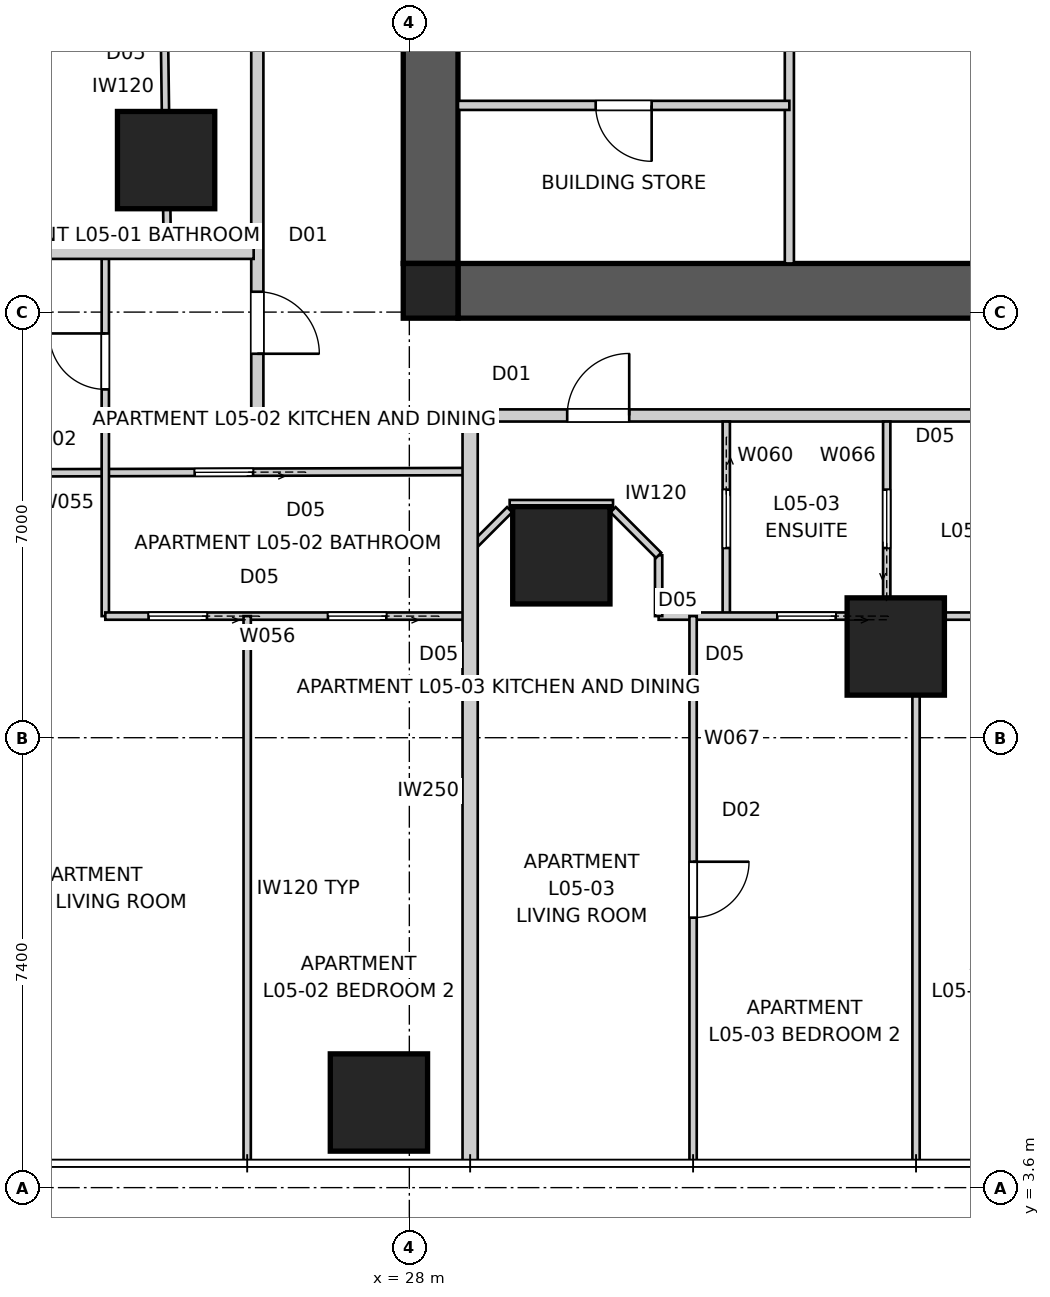
"""IFC4 building model, lengths in metres.
Left out: names, types, materials, properties, quantities, classifications, styles, units other than length and angle.
Written with IfcOpenShell. Run it as: python <this file> out.ifc"""

import sys

from ifc_helpers import new_model, si_unit, direction, frame, frame_2d, origin, origin_2d, place, context, subcontext, project, spatial, polyline, rectangle, outline, extrude, element, fill, save


model = new_model("IFC4")
c1 = context("Model", 3, precision=1e-05, world=origin(), true_north=direction((0.0, 1.0)))
c2 = subcontext(c1, "Body", "Model", "MODEL_VIEW")
j1 = project(units=[si_unit("LENGTHUNIT", "METRE"), si_unit("PLANEANGLEUNIT", "RADIAN")], contexts=[c1])
p1 = place(None, origin())
s1 = spatial("IfcSite", under=j1, at=p1, CompositionType="ELEMENT")
p2 = place(p1, origin())
s2 = spatial("IfcBuilding", under=s1, at=p2, CompositionType="ELEMENT")
p3 = place(p2, frame((0.0, 0.0, 21.8)))
s3 = spatial("IfcBuildingStorey", under=s2, at=p3, CompositionType="ELEMENT", Elevation=21.8)
p4 = place(p3, frame((51.2, 18.35, 0.0), z_axis=(0.0, 0.0, 1.0), x_axis=(-1.0, 0.0, 0.0)))
e1 = element("IfcWall", 1, at=p4, inside=s3, PredefinedType="SHEAR", context=c2, shape_type="SweptSolid", body=[
    extrude(outline(polyline([(0.0, -0.45), (22.4, -0.45), (22.4, -0.025), (22.85, -0.025), (22.85, 0.025), (22.4, 0.025), (22.4, 0.45), (0.0, 0.45), (0.0, 0.025), (-0.45, 0.025), (-0.45, -0.025), (0.0, -0.025), (0.0, -0.45)])), origin(), (0.0, 0.0, 1.0), 3.4),
])
p5 = place(p3, frame((28.35, 41.2, 0.0), z_axis=(0.0, 0.0, 1.0), x_axis=(0.0, -1.0, 0.0)))
e2 = element("IfcWall", 2, at=p5, inside=s3, PredefinedType="SHEAR", context=c2, shape_type="SweptSolid", body=[
    extrude(outline(polyline([(0.0, -0.45), (22.4, -0.45), (22.4, -0.025), (22.85, -0.025), (22.85, 0.025), (22.4, 0.025), (22.4, 0.45), (0.0, 0.45), (0.0, 0.025), (-0.45, 0.025), (-0.45, -0.025), (0.0, -0.025), (0.0, -0.45)])), origin(), (0.0, 0.0, 1.0), 3.4),
])
p6 = place(p5, frame((11.14, 0.0, 0.0)))
e3 = element("IfcOpeningElement", 3, at=p6, cuts=e2, PredefinedType="OPENING", context=c2, shape_type="SweptSolid", body=[
    extrude(rectangle(XDim=1.02, YDim=2.4, at=frame_2d((0.51, 1.2))), frame((0.0, 0.46, 0.0), z_axis=(0.0, -1.0, 0.0), x_axis=(1.0, 0.0, 0.0)), (0.0, 0.0, 1.0), 0.92),
])
p7 = place(p3, frame((28.35, 18.35, 0.0), z_axis=(0.0, 0.0, 1.0), x_axis=(1.0, 0.0, 0.0)))
e4 = element("IfcColumn", 4, at=p7, inside=s3, PredefinedType="COLUMN", context=c2, shape_type="SweptSolid", body=[
    extrude(rectangle(XDim=0.9, YDim=0.9, at=origin_2d()), origin(), (0.0, 0.0, 1.0), 3.4),
])
for number, where, z_axis, x_axis in (
    (5, (27.5, 5.0, 0.0), (0.0, 0.0, 1.0), (1.0, 0.0, 0.0)),
    (6, (24.0, 20.5, 0.0), (0.0, 0.0, 1.0), (1.0, 0.0, 0.0)),
    (7, (30.5, 14.0, 0.0), (0.0, 0.0, 1.0), (1.0, 0.0, 0.0)),
    (8, (36.0, 12.5, 0.0), (0.0, 0.0, 1.0), (1.0, 0.0, 0.0)),
):
    element("IfcColumn", number, at=place(p3, frame(where, z_axis=z_axis, x_axis=x_axis)), inside=s3, PredefinedType="COLUMN", context=c2, shape_type="SweptSolid", body=[
        extrude(rectangle(XDim=1.6, YDim=1.6, at=origin_2d()), origin(), (0.0, 0.0, 1.0), 3.4),
    ])
p8 = place(p3, frame((25.5, 16.3, 0.0), z_axis=(0.0, 0.0, 1.0), x_axis=(1.0, 0.0, 0.0)))
e9 = element("IfcWall", 9, at=p8, inside=s3, PredefinedType="PARTITIONING", context=c2, shape_type="SweptSolid", body=[
    extrude(rectangle(XDim=29.0, YDim=0.2, at=frame_2d((14.5, 0.0))), origin(), (0.0, 0.0, 1.0), 3.25),
])
p9 = place(p8, frame((18.734, 0.0, 0.0)))
e10 = element("IfcOpeningElement", 10, at=p9, cuts=e9, PredefinedType="OPENING", context=c2, shape_type="SweptSolid", body=[
    extrude(rectangle(XDim=1.02, YDim=2.34, at=frame_2d((0.51, 1.17))), frame((0.0, 0.11, 0.0), z_axis=(0.0, -1.0, 0.0), x_axis=(1.0, 0.0, 0.0)), (0.0, 0.0, 1.0), 0.22),
])
p10 = place(p8, frame((5.096, 0.0, 0.0)))
e11 = element("IfcOpeningElement", 11, at=p10, cuts=e9, PredefinedType="OPENING", context=c2, shape_type="SweptSolid", body=[
    extrude(rectangle(XDim=1.02, YDim=2.34, at=frame_2d((0.51, 1.17))), frame((0.0, 0.11, 0.0), z_axis=(0.0, -1.0, 0.0), x_axis=(1.0, 0.0, 0.0)), (0.0, 0.0, 1.0), 0.22),
])
p11 = place(p3, frame((25.5, 43.7, 0.0), z_axis=(0.0, 0.0, 1.0), x_axis=(0.0, -1.0, 0.0)))
e12 = element("IfcWall", 12, at=p11, inside=s3, PredefinedType="PARTITIONING", context=c2, shape_type="SweptSolid", body=[
    extrude(rectangle(XDim=27.4, YDim=0.2, at=frame_2d((13.7, 0.0))), origin(), (0.0, 0.0, 1.0), 3.25),
])
p12 = place(p11, frame((5.493, 0.0, 0.0)))
e13 = element("IfcOpeningElement", 13, at=p12, cuts=e12, PredefinedType="OPENING", context=c2, shape_type="SweptSolid", body=[
    extrude(rectangle(XDim=1.02, YDim=2.34, at=frame_2d((0.51, 1.17))), frame((0.0, 0.11, 0.0), z_axis=(0.0, -1.0, 0.0), x_axis=(1.0, 0.0, 0.0)), (0.0, 0.0, 1.0), 0.22),
])
p13 = place(p11, frame((15.16, 0.0, 0.0)))
e14 = element("IfcOpeningElement", 14, at=p13, cuts=e12, PredefinedType="OPENING", context=c2, shape_type="SweptSolid", body=[
    extrude(rectangle(XDim=1.02, YDim=2.34, at=frame_2d((0.51, 1.17))), frame((0.0, 0.11, 0.0), z_axis=(0.0, -1.0, 0.0), x_axis=(1.0, 0.0, 0.0)), (0.0, 0.0, 1.0), 0.22),
])
p14 = place(p11, frame((25.365, 0.0, 0.0)))
e15 = element("IfcOpeningElement", 15, at=p14, cuts=e12, PredefinedType="OPENING", context=c2, shape_type="SweptSolid", body=[
    extrude(rectangle(XDim=1.02, YDim=2.34, at=frame_2d((0.51, 1.17))), frame((0.0, 0.11, 0.0), z_axis=(0.0, -1.0, 0.0), x_axis=(1.0, 0.0, 0.0)), (0.0, 0.0, 1.0), 0.22),
])
p15 = place(p11, frame((1.015, 0.0, 0.0)))
e16 = element("IfcOpeningElement", 16, at=p15, cuts=e12, PredefinedType="OPENING", context=c2, shape_type="SweptSolid", body=[
    extrude(rectangle(XDim=1.02, YDim=2.34, at=frame_2d((0.51, 1.17))), frame((0.0, 0.11, 0.0), z_axis=(0.0, -1.0, 0.0), x_axis=(1.0, 0.0, 0.0)), (0.0, 0.0, 1.0), 0.22),
])
p16 = place(p3, frame((29.0, 4.0, 0.0), z_axis=(0.0, 0.0, 1.0), x_axis=(0.0, 1.0, 0.0)))
e17 = element("IfcWall", 17, at=p16, inside=s3, PredefinedType="PARTITIONING", context=c2, shape_type="SweptSolid", body=[
    extrude(rectangle(XDim=12.24, YDim=0.25, at=frame_2d((6.12, 0.0))), origin(), (0.0, 0.0, 1.0), 3.25),
])
p17 = place(p3, frame((14.0, 19.0, 0.0), z_axis=(0.0, 0.0, 1.0), x_axis=(1.0, 0.0, 0.0)))
e18 = element("IfcWall", 18, at=p17, inside=s3, PredefinedType="PARTITIONING", context=c2, shape_type="SweptSolid", body=[
    extrude(rectangle(XDim=11.44, YDim=0.25, at=frame_2d((5.72, 0.0))), origin(), (0.0, 0.0, 1.0), 3.25),
])
p18 = place(p3, frame((34.25, 18.8, 0.0), z_axis=(0.0, 0.0, 1.0), x_axis=(0.0, 1.0, 0.0)))
e19 = element("IfcWall", 19, at=p18, inside=s3, PredefinedType="SOLIDWALL", context=c2, shape_type="SweptSolid", body=[
    extrude(rectangle(XDim=5.9, YDim=0.15, at=frame_2d((2.95, 0.0))), origin(), (0.0, 0.0, 1.0), 3.25),
])
p19 = place(p3, frame((34.25, 21.4, 0.0), z_axis=(0.0, 0.0, 1.0), x_axis=(-1.0, 0.0, 0.0)))
e20 = element("IfcWall", 20, at=p19, inside=s3, PredefinedType="SOLIDWALL", context=c2, shape_type="SweptSolid", body=[
    extrude(rectangle(XDim=5.45, YDim=0.15, at=frame_2d((2.725, 0.0))), origin(), (0.0, 0.0, 1.0), 3.25),
])
p20 = place(p19, frame((2.265, 0.0, 0.0)))
e21 = element("IfcOpeningElement", 21, at=p20, cuts=e20, PredefinedType="OPENING", context=c2, shape_type="SweptSolid", body=[
    extrude(rectangle(XDim=0.92, YDim=2.1, at=frame_2d((0.46, 1.05))), frame((0.0, 0.085, 0.0), z_axis=(0.0, -1.0, 0.0), x_axis=(1.0, 0.0, 0.0)), (0.0, 0.0, 1.0), 0.17),
])
p21 = place(p3, frame((24.02, 19.0, 0.0), z_axis=(0.0, 0.0, 1.0), x_axis=(-0.013494388256, 0.999908946597, 0.0)))
e22 = element("IfcWall", 22, at=p21, inside=s3, PredefinedType="PARTITIONING", context=c2, shape_type="SweptSolid", body=[
    extrude(rectangle(XDim=3.872, YDim=0.12, at=frame_2d((1.936, 0.0))), origin(), (0.0, 0.0, 1.0), 2.549),
])
p22 = place(p3, frame((29.0, 15.378, 0.0), z_axis=(0.0, 0.0, 1.0), x_axis=(-0.999995589081, -0.002970154664, 0.0)))
e23 = element("IfcWall", 23, at=p22, inside=s3, PredefinedType="PARTITIONING", context=c2, shape_type="SweptSolid", body=[
    extrude(rectangle(XDim=14.96, YDim=0.12, at=frame_2d((7.48, 0.0))), origin(), (0.0, 0.0, 1.0), 2.638),
])
p23 = place(p22, frame((3.57, 0.0, 0.0)))
e24 = element("IfcOpeningElement", 24, at=p23, cuts=e23, PredefinedType="OPENING", context=c2, shape_type="SweptSolid", body=[
    extrude(rectangle(XDim=0.96, YDim=2.1, at=frame_2d((0.48, 1.05))), frame((0.0, 0.07, 0.0), z_axis=(0.0, -1.0, 0.0), x_axis=(1.0, 0.0, 0.0)), (0.0, 0.0, 1.0), 0.14),
])
p24 = place(p3, frame((23.0, 13.0, 0.0), z_axis=(0.0, 0.0, 1.0), x_axis=(0.0, 1.0, 0.0)))
e25 = element("IfcWall", 25, at=p24, inside=s3, PredefinedType="PARTITIONING", context=c2, shape_type="SweptSolid", body=[
    extrude(rectangle(XDim=6.0, YDim=0.12, at=frame_2d((3.0, 0.0))), origin(), (0.0, 0.0, 1.0), 3.25),
])
p25 = place(p24, frame((3.729, 0.0, 0.0)))
e26 = element("IfcOpeningElement", 26, at=p25, cuts=e25, PredefinedType="OPENING", context=c2, shape_type="SweptSolid", body=[
    extrude(rectangle(XDim=0.92, YDim=2.34, at=frame_2d((0.46, 1.17))), frame((0.0, 0.07, 0.0), z_axis=(0.0, -1.0, 0.0), x_axis=(1.0, 0.0, 0.0)), (0.0, 0.0, 1.0), 0.14),
])
p26 = place(p3, frame((29.0, 13.0, 0.0), z_axis=(0.0, 0.0, 1.0), x_axis=(-1.0, 0.0, 0.0)))
e27 = element("IfcWall", 27, at=p26, inside=s3, PredefinedType="PARTITIONING", context=c2, shape_type="SweptSolid", body=[
    extrude(rectangle(XDim=6.0, YDim=0.12, at=frame_2d((3.0, 0.0))), origin(), (0.0, 0.0, 1.0), 3.25),
])
p27 = place(p26, frame((1.378, 0.0, 0.0)))
e28 = element("IfcOpeningElement", 28, at=p27, cuts=e27, PredefinedType="OPENING", context=c2, shape_type="SweptSolid", body=[
    extrude(rectangle(XDim=0.96, YDim=2.1, at=frame_2d((0.48, 1.05))), frame((0.0, 0.07, 0.0), z_axis=(0.0, -1.0, 0.0), x_axis=(1.0, 0.0, 0.0)), (0.0, 0.0, 1.0), 0.14),
])
p28 = place(p26, frame((4.328, 0.0, 0.0)))
e29 = element("IfcOpeningElement", 29, at=p28, cuts=e27, PredefinedType="OPENING", context=c2, shape_type="SweptSolid", body=[
    extrude(rectangle(XDim=0.96, YDim=2.1, at=frame_2d((0.48, 1.05))), frame((0.0, 0.07, 0.0), z_axis=(0.0, -1.0, 0.0), x_axis=(1.0, 0.0, 0.0)), (0.0, 0.0, 1.0), 0.14),
])
p29 = place(p3, frame((25.333, 13.0, 0.0), z_axis=(0.0, 0.0, 1.0), x_axis=(0.0, -1.0, 0.0)))
e30 = element("IfcWall", 30, at=p29, inside=s3, PredefinedType="PARTITIONING", context=c2, shape_type="SweptSolid", body=[
    extrude(rectangle(XDim=8.96, YDim=0.12, at=frame_2d((4.48, 0.0))), origin(), (0.0, 0.0, 1.0), 2.638),
])
p30 = place(p3, frame((33.212, 16.2, 0.0), z_axis=(0.0, 0.0, 1.0), x_axis=(0.0, -1.0, 0.0)))
e31 = element("IfcWall", 31, at=p30, inside=s3, PredefinedType="PARTITIONING", context=c2, shape_type="SweptSolid", body=[
    extrude(rectangle(XDim=3.2, YDim=0.12, at=frame_2d((1.6, 0.0))), origin(), (0.0, 0.0, 1.0), 3.25),
])
p31 = place(p30, frame((1.12, 0.0, 0.0)))
e32 = element("IfcOpeningElement", 32, at=p31, cuts=e31, PredefinedType="OPENING", context=c2, shape_type="SweptSolid", body=[
    extrude(rectangle(XDim=0.96, YDim=2.1, at=frame_2d((0.48, 1.05))), frame((0.0, 0.07, 0.0), z_axis=(0.0, -1.0, 0.0), x_axis=(1.0, 0.0, 0.0)), (0.0, 0.0, 1.0), 0.14),
])
p32 = place(p3, frame((47.9, 13.0, 0.0), z_axis=(0.0, 0.0, 1.0), x_axis=(-1.0, 0.0, 0.0)))
e33 = element("IfcWall", 33, at=p32, inside=s3, PredefinedType="PARTITIONING", context=c2, shape_type="SweptSolid", body=[
    extrude(rectangle(XDim=15.8, YDim=0.12, at=frame_2d((7.9, 0.0))), origin(), (0.0, 0.0, 1.0), 2.549),
])
p33 = place(p32, frame((2.083, 0.0, 0.0)))
e34 = element("IfcOpeningElement", 34, at=p33, cuts=e33, PredefinedType="OPENING", context=c2, shape_type="SweptSolid", body=[
    extrude(rectangle(XDim=0.92, YDim=2.34, at=frame_2d((0.46, 1.17))), frame((0.0, 0.07, 0.0), z_axis=(0.0, -1.0, 0.0), x_axis=(1.0, 0.0, 0.0)), (0.0, 0.0, 1.0), 0.14),
])
p34 = place(p32, frame((6.225, 0.0, 0.0)))
e35 = element("IfcOpeningElement", 35, at=p34, cuts=e33, PredefinedType="OPENING", context=c2, shape_type="SweptSolid", body=[
    extrude(rectangle(XDim=0.96, YDim=2.1, at=frame_2d((0.48, 1.05))), frame((0.0, 0.07, 0.0), z_axis=(0.0, -1.0, 0.0), x_axis=(1.0, 0.0, 0.0)), (0.0, 0.0, 1.0), 0.14),
])
p35 = place(p32, frame((12.888, 0.0, 0.0)))
e36 = element("IfcOpeningElement", 36, at=p35, cuts=e33, PredefinedType="OPENING", context=c2, shape_type="SweptSolid", body=[
    extrude(rectangle(XDim=0.96, YDim=2.1, at=frame_2d((0.48, 1.05))), frame((0.0, 0.07, 0.0), z_axis=(0.0, -1.0, 0.0), x_axis=(1.0, 0.0, 0.0)), (0.0, 0.0, 1.0), 0.14),
])
p36 = place(p32, frame((9.278, 0.0, 0.0)))
e37 = element("IfcOpeningElement", 37, at=p36, cuts=e33, PredefinedType="OPENING", context=c2, shape_type="SweptSolid", body=[
    extrude(rectangle(XDim=0.96, YDim=2.1, at=frame_2d((0.48, 1.05))), frame((0.0, 0.07, 0.0), z_axis=(0.0, -1.0, 0.0), x_axis=(1.0, 0.0, 0.0)), (0.0, 0.0, 1.0), 0.14),
])
p37 = place(p3, frame((32.1, 13.0, 0.0), z_axis=(0.0, 0.0, 1.0), x_axis=(0.0, 1.0, 0.0)))
e38 = element("IfcWall", 38, at=p37, inside=s3, PredefinedType="PARTITIONING", context=c2, shape_type="SweptSolid", body=[
    extrude(rectangle(XDim=1.0, YDim=0.12, at=frame_2d((0.5, 0.0))), origin(), (0.0, 0.0, 1.0), 3.25),
])
p38 = place(p3, frame((32.1, 14.0, 0.0), z_axis=(0.0, 0.0, 1.0), x_axis=(-0.707106781187, 0.707106781187, 0.0)))
e39 = element("IfcWall", 39, at=p38, inside=s3, PredefinedType="PARTITIONING", context=c2, shape_type="SweptSolid", body=[
    extrude(rectangle(XDim=1.061, YDim=0.12, at=frame_2d((0.53, 0.0))), origin(), (0.0, 0.0, 1.0), 3.25),
])
p39 = place(p3, frame((31.35, 14.85, 0.0), z_axis=(0.0, 0.0, 1.0), x_axis=(-1.0, 0.0, 0.0)))
e40 = element("IfcWall", 40, at=p39, inside=s3, PredefinedType="PARTITIONING", context=c2, shape_type="SweptSolid", body=[
    extrude(rectangle(XDim=1.7, YDim=0.12, at=frame_2d((0.85, 0.0))), origin(), (0.0, 0.0, 1.0), 3.25),
])
p40 = place(p3, frame((29.65, 14.75, 0.0), z_axis=(0.0, 0.0, 1.0), x_axis=(-0.707106781187, -0.707106781187, 0.0)))
e41 = element("IfcWall", 41, at=p40, inside=s3, PredefinedType="PARTITIONING", context=c2, shape_type="SweptSolid", body=[
    extrude(rectangle(XDim=0.919, YDim=0.12, at=frame_2d((0.459, 0.0))), origin(), (0.0, 0.0, 1.0), 3.25),
])
p41 = place(p3, frame((35.851, 13.0, 0.0), z_axis=(0.0, 0.0, 1.0), x_axis=(0.0, 1.0, 0.0)))
e42 = element("IfcWall", 42, at=p41, inside=s3, PredefinedType="PARTITIONING", context=c2, shape_type="SweptSolid", body=[
    extrude(rectangle(XDim=3.2, YDim=0.12, at=frame_2d((1.6, 0.0))), origin(), (0.0, 0.0, 1.0), 3.25),
])
p42 = place(p41, frame((1.12, 0.0, 0.0)))
e43 = element("IfcOpeningElement", 43, at=p42, cuts=e42, PredefinedType="OPENING", context=c2, shape_type="SweptSolid", body=[
    extrude(rectangle(XDim=0.96, YDim=2.1, at=frame_2d((0.48, 1.05))), frame((0.0, 0.07, 0.0), z_axis=(0.0, -1.0, 0.0), x_axis=(1.0, 0.0, 0.0)), (0.0, 0.0, 1.0), 0.14),
])
p43 = place(p3, frame((32.667, 13.0, 0.0), z_axis=(0.0, 0.0, 1.0), x_axis=(0.0, -1.0, 0.0)))
e44 = element("IfcWall", 44, at=p43, inside=s3, PredefinedType="PARTITIONING", context=c2, shape_type="SweptSolid", body=[
    extrude(rectangle(XDim=8.96, YDim=0.12, at=frame_2d((4.48, 0.0))), origin(), (0.0, 0.0, 1.0), 3.25),
])
p44 = place(p43, frame((4.04, 0.0, 0.0)))
e45 = element("IfcOpeningElement", 45, at=p44, cuts=e44, PredefinedType="OPENING", context=c2, shape_type="SweptSolid", body=[
    extrude(rectangle(XDim=0.92, YDim=2.34, at=frame_2d((0.46, 1.17))), frame((0.0, 0.07, 0.0), z_axis=(0.0, -1.0, 0.0), x_axis=(1.0, 0.0, 0.0)), (0.0, 0.0, 1.0), 0.14),
])
p45 = place(p3, frame((36.333, 4.04, 0.0), z_axis=(0.0, 0.0, 1.0), x_axis=(0.0, 1.0, 0.0)))
e46 = element("IfcWall", 46, at=p45, inside=s3, PredefinedType="PARTITIONING", context=c2, shape_type="SweptSolid", body=[
    extrude(rectangle(XDim=8.96, YDim=0.12, at=frame_2d((4.48, 0.0))), origin(), (0.0, 0.0, 1.0), 3.25),
])
p46 = place(p10, origin())
e47 = element("IfcDoor", 47, at=p46, inside=s3, OperationType="SINGLE_SWING_RIGHT", PredefinedType="DOOR", context=c2, shape_type="SweptSolid", body=[
    extrude(rectangle(XDim=1.02, YDim=2.34, at=frame_2d((0.51, 1.17))), frame((0.0, 0.025, 0.0), z_axis=(0.0, -1.0, 0.0), x_axis=(1.0, 0.0, 0.0)), (0.0, 0.0, 1.0), 0.05),
])
fill(e11, e47)
p47 = place(p14, origin())
e48 = element("IfcDoor", 48, at=p47, inside=s3, OperationType="SINGLE_SWING_RIGHT", PredefinedType="DOOR", context=c2, shape_type="SweptSolid", body=[
    extrude(rectangle(XDim=1.02, YDim=2.34, at=frame_2d((0.51, 1.17))), frame((0.0, 0.025, 0.0), z_axis=(0.0, -1.0, 0.0), x_axis=(1.0, 0.0, 0.0)), (0.0, 0.0, 1.0), 0.05),
])
fill(e15, e48)
p48 = place(p20, origin())
e49 = element("IfcDoor", 49, at=p48, inside=s3, OperationType="SINGLE_SWING_LEFT", PredefinedType="DOOR", context=c2, shape_type="SweptSolid", body=[
    extrude(rectangle(XDim=0.92, YDim=2.1, at=frame_2d((0.46, 1.05))), frame((0.0, 0.025, 0.0), z_axis=(0.0, -1.0, 0.0), x_axis=(1.0, 0.0, 0.0)), (0.0, 0.0, 1.0), 0.05),
])
fill(e21, e49)
p49 = place(p31, origin())
e50 = element("IfcDoor", 50, at=p49, inside=s3, OperationType="SLIDING_TO_LEFT", PredefinedType="DOOR", context=c2, shape_type="SweptSolid", body=[
    extrude(rectangle(XDim=0.96, YDim=2.1, at=frame_2d((0.48, 1.05))), frame((0.0, 0.025, 0.0), z_axis=(0.0, -1.0, 0.0), x_axis=(1.0, 0.0, 0.0)), (0.0, 0.0, 1.0), 0.05),
])
fill(e32, e50)
p50 = place(p23, origin())
e51 = element("IfcDoor", 51, at=p50, inside=s3, OperationType="SLIDING_TO_LEFT", PredefinedType="DOOR", context=c2, shape_type="SweptSolid", body=[
    extrude(rectangle(XDim=0.96, YDim=2.1, at=frame_2d((0.48, 1.05))), frame((0.0, 0.025, 0.0), z_axis=(0.0, -1.0, 0.0), x_axis=(1.0, 0.0, 0.0)), (0.0, 0.0, 1.0), 0.05),
])
fill(e24, e51)
p51 = place(p25, origin())
e52 = element("IfcDoor", 52, at=p51, inside=s3, OperationType="SINGLE_SWING_RIGHT", PredefinedType="DOOR", context=c2, shape_type="SweptSolid", body=[
    extrude(rectangle(XDim=0.92, YDim=2.34, at=frame_2d((0.46, 1.17))), frame((0.0, 0.025, 0.0), z_axis=(0.0, -1.0, 0.0), x_axis=(1.0, 0.0, 0.0)), (0.0, 0.0, 1.0), 0.05),
])
fill(e26, e52)
p52 = place(p42, origin())
e53 = element("IfcDoor", 53, at=p52, inside=s3, OperationType="SLIDING_TO_LEFT", PredefinedType="DOOR", context=c2, shape_type="SweptSolid", body=[
    extrude(rectangle(XDim=0.96, YDim=2.1, at=frame_2d((0.48, 1.05))), frame((0.0, 0.025, 0.0), z_axis=(0.0, -1.0, 0.0), x_axis=(1.0, 0.0, 0.0)), (0.0, 0.0, 1.0), 0.05),
])
fill(e43, e53)
p53 = place(p35, origin())
e54 = element("IfcDoor", 54, at=p53, inside=s3, OperationType="SLIDING_TO_LEFT", PredefinedType="DOOR", context=c2, shape_type="SweptSolid", body=[
    extrude(rectangle(XDim=0.96, YDim=2.1, at=frame_2d((0.48, 1.05))), frame((0.0, 0.025, 0.0), z_axis=(0.0, -1.0, 0.0), x_axis=(1.0, 0.0, 0.0)), (0.0, 0.0, 1.0), 0.05),
])
fill(e36, e54)
p54 = place(p27, origin())
e55 = element("IfcDoor", 55, at=p54, inside=s3, OperationType="SLIDING_TO_LEFT", PredefinedType="DOOR", context=c2, shape_type="SweptSolid", body=[
    extrude(rectangle(XDim=0.96, YDim=2.1, at=frame_2d((0.48, 1.05))), frame((0.0, 0.025, 0.0), z_axis=(0.0, -1.0, 0.0), x_axis=(1.0, 0.0, 0.0)), (0.0, 0.0, 1.0), 0.05),
])
fill(e28, e55)
p55 = place(p28, origin())
e56 = element("IfcDoor", 56, at=p55, inside=s3, OperationType="SLIDING_TO_LEFT", PredefinedType="DOOR", context=c2, shape_type="SweptSolid", body=[
    extrude(rectangle(XDim=0.96, YDim=2.1, at=frame_2d((0.48, 1.05))), frame((0.0, 0.025, 0.0), z_axis=(0.0, -1.0, 0.0), x_axis=(1.0, 0.0, 0.0)), (0.0, 0.0, 1.0), 0.05),
])
fill(e29, e56)
p56 = place(p44, origin())
e57 = element("IfcDoor", 57, at=p56, inside=s3, OperationType="SINGLE_SWING_LEFT", PredefinedType="DOOR", context=c2, shape_type="SweptSolid", body=[
    extrude(rectangle(XDim=0.92, YDim=2.34, at=frame_2d((0.46, 1.17))), frame((0.0, 0.025, 0.0), z_axis=(0.0, -1.0, 0.0), x_axis=(1.0, 0.0, 0.0)), (0.0, 0.0, 1.0), 0.05),
])
fill(e45, e57)
save(model, sys.argv[1])
